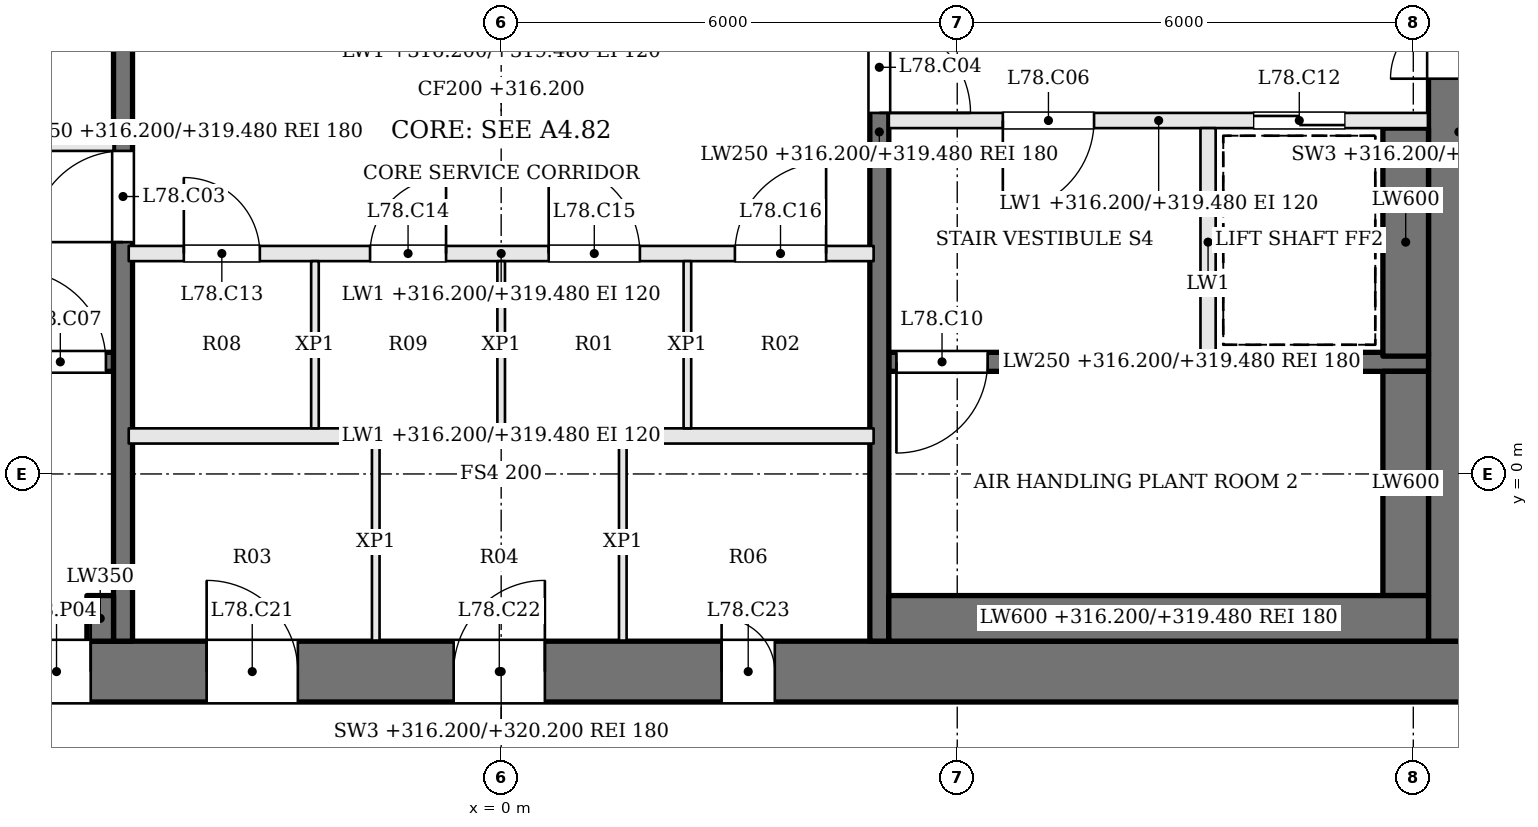
"""IFC4 building model, lengths in metres.
Left out: names, types, materials, properties, quantities, classifications, styles, units other than length and angle.
Written with IfcOpenShell. Run it as: python <this file> out.ifc"""

import sys

from ifc_helpers import new_model, si_unit, direction, frame, frame_2d, origin, place, context, subcontext, project, spatial, rectangle, extrude, element, fill, save


model = new_model("IFC4")
c1 = context("Model", 3, precision=1e-05, world=origin(), true_north=direction((0.0, 1.0)))
c2 = subcontext(c1, "Body", "Model", "MODEL_VIEW")
j1 = project(units=[si_unit("LENGTHUNIT", "METRE"), si_unit("PLANEANGLEUNIT", "RADIAN")], contexts=[c1])
p1 = place(None, origin())
s1 = spatial("IfcSite", under=j1, at=p1, CompositionType="ELEMENT")
p2 = place(p1, origin())
s2 = spatial("IfcBuilding", under=s1, at=p2, CompositionType="ELEMENT")
p3 = place(p2, frame((0.0, 0.0, 316.2)))
s3 = spatial("IfcBuildingStorey", under=s2, at=p3, CompositionType="ELEMENT", Elevation=316.2)
p4 = place(p3, frame((-13.0, -2.6, 0.0), z_axis=(0.0, 0.0, 1.0), x_axis=(1.0, 0.0, 0.0)))
e1 = element("IfcWall", 1, at=p4, inside=s3, PredefinedType="SHEAR", context=c2, shape_type="SweptSolid", body=[
    extrude(rectangle(XDim=26.0, YDim=0.8, at=frame_2d((13.0, 0.0))), origin(), (0.0, 0.0, 1.0), 4.0),
])
p5 = place(p4, frame((9.125, 0.0, 0.0)))
e2 = element("IfcOpeningElement", 2, at=p5, cuts=e1, PredefinedType="OPENING", context=c2, shape_type="SweptSolid", body=[
    extrude(rectangle(XDim=1.2, YDim=2.1, at=frame_2d((0.6, 1.05))), frame((0.0, 0.41, 0.0), z_axis=(0.0, -1.0, 0.0), x_axis=(1.0, 0.0, 0.0)), (0.0, 0.0, 1.0), 0.82),
])
p6 = place(p4, frame((12.375, 0.0, 0.0)))
e3 = element("IfcOpeningElement", 3, at=p6, cuts=e1, PredefinedType="OPENING", context=c2, shape_type="SweptSolid", body=[
    extrude(rectangle(XDim=1.2, YDim=2.1, at=frame_2d((0.6, 1.05))), frame((0.0, 0.41, 0.0), z_axis=(0.0, -1.0, 0.0), x_axis=(1.0, 0.0, 0.0)), (0.0, 0.0, 1.0), 0.82),
])
p7 = place(p4, frame((15.9, 0.0, 0.0)))
e4 = element("IfcOpeningElement", 4, at=p7, cuts=e1, PredefinedType="OPENING", context=c2, shape_type="SweptSolid", body=[
    extrude(rectangle(XDim=0.7, YDim=2.1, at=frame_2d((0.35, 1.05))), frame((0.0, 0.41, 0.0), z_axis=(0.0, -1.0, 0.0), x_axis=(1.0, 0.0, 0.0)), (0.0, 0.0, 1.0), 0.82),
])
p8 = place(p4, frame((6.7, 0.0, 0.0)))
e5 = element("IfcOpeningElement", 5, at=p8, cuts=e1, PredefinedType="OPENING", context=c2, shape_type="SweptSolid", body=[
    extrude(rectangle(XDim=0.9, YDim=2.1, at=frame_2d((0.45, 1.05))), frame((0.0, 0.41, 0.0), z_axis=(0.0, -1.0, 0.0), x_axis=(1.0, 0.0, 0.0)), (0.0, 0.0, 1.0), 0.82),
])
p9 = place(p3, frame((12.6, -2.2, 0.0), z_axis=(0.0, 0.0, 1.0), x_axis=(0.0, 1.0, 0.0)))
e6 = element("IfcWall", 6, at=p9, inside=s3, PredefinedType="SHEAR", context=c2, shape_type="SweptSolid", body=[
    extrude(rectangle(XDim=13.4, YDim=0.8, at=frame_2d((6.7, 0.0))), origin(), (0.0, 0.0, 1.0), 4.0),
])
p10 = place(p9, frame((7.4, 0.0, 0.0)))
e7 = element("IfcOpeningElement", 7, at=p10, cuts=e6, PredefinedType="OPENING", context=c2, shape_type="SweptSolid", body=[
    extrude(rectangle(XDim=1.8, YDim=2.1, at=frame_2d((0.9, 1.05))), frame((0.0, 0.41, 0.0), z_axis=(0.0, -1.0, 0.0), x_axis=(1.0, 0.0, 0.0)), (0.0, 0.0, 1.0), 0.82),
])
p11 = place(p3, frame((-12.2, 1.475, 0.0), z_axis=(0.0, 0.0, 1.0), x_axis=(1.0, 0.0, 0.0)))
e8 = element("IfcWall", 8, at=p11, inside=s3, PredefinedType="SOLIDWALL", context=c2, shape_type="SweptSolid", body=[
    extrude(rectangle(XDim=7.1, YDim=0.25, at=frame_2d((3.55, 0.0))), origin(), (0.0, 0.0, 1.0), 3.28),
])
p12 = place(p11, frame((5.8, 0.0, 0.0)))
e9 = element("IfcOpeningElement", 9, at=p12, cuts=e8, PredefinedType="OPENING", context=c2, shape_type="SweptSolid", body=[
    extrude(rectangle(XDim=1.2, YDim=2.1, at=frame_2d((0.6, 1.05))), frame((0.0, 0.135, 0.0), z_axis=(0.0, -1.0, 0.0), x_axis=(1.0, 0.0, 0.0)), (0.0, 0.0, 1.0), 0.27),
])
p13 = place(p3, frame((-12.2, 4.35, 0.0), z_axis=(0.0, 0.0, 1.0), x_axis=(1.0, 0.0, 0.0)))
e10 = element("IfcWall", 10, at=p13, inside=s3, PredefinedType="SOLIDWALL", context=c2, shape_type="SweptSolid", body=[
    extrude(rectangle(XDim=7.1, YDim=0.2, at=frame_2d((3.55, 0.0))), origin(), (0.0, 0.0, 1.0), 3.28),
])
p14 = place(p13, frame((4.4, 0.0, 0.0)))
e11 = element("IfcOpeningElement", 11, at=p14, cuts=e10, PredefinedType="OPENING", context=c2, shape_type="SweptSolid", body=[
    extrude(rectangle(XDim=1.2, YDim=2.1, at=frame_2d((0.6, 1.05))), frame((0.0, 0.11, 0.0), z_axis=(0.0, -1.0, 0.0), x_axis=(1.0, 0.0, 0.0)), (0.0, 0.0, 1.0), 0.22),
])
p15 = place(p13, frame((1.1, 0.0, 0.0)))
e12 = element("IfcOpeningElement", 12, at=p15, cuts=e10, PredefinedType="OPENING", context=c2, shape_type="SweptSolid", body=[
    extrude(rectangle(XDim=1.2, YDim=2.1, at=frame_2d((0.6, 1.05))), frame((0.0, 0.11, 0.0), z_axis=(0.0, -1.0, 0.0), x_axis=(1.0, 0.0, 0.0)), (0.0, 0.0, 1.0), 0.22),
])
p16 = place(p3, frame((12.2, 4.65, 0.0), z_axis=(0.0, 0.0, 1.0), x_axis=(-1.0, 0.0, 0.0)))
e13 = element("IfcWall", 13, at=p16, inside=s3, PredefinedType="SOLIDWALL", context=c2, shape_type="SweptSolid", body=[
    extrude(rectangle(XDim=7.1, YDim=0.2, at=frame_2d((3.55, 0.0))), origin(), (0.0, 0.0, 1.0), 3.28),
])
p17 = place(p16, frame((4.4, 0.0, 0.0)))
e14 = element("IfcOpeningElement", 14, at=p17, cuts=e13, PredefinedType="OPENING", context=c2, shape_type="SweptSolid", body=[
    extrude(rectangle(XDim=1.2, YDim=2.1, at=frame_2d((0.6, 1.05))), frame((0.0, 0.11, 0.0), z_axis=(0.0, -1.0, 0.0), x_axis=(1.0, 0.0, 0.0)), (0.0, 0.0, 1.0), 0.22),
])
p18 = place(p16, frame((1.1, 0.0, 0.0)))
e15 = element("IfcOpeningElement", 15, at=p18, cuts=e13, PredefinedType="OPENING", context=c2, shape_type="SweptSolid", body=[
    extrude(rectangle(XDim=1.2, YDim=2.1, at=frame_2d((0.6, 1.05))), frame((0.0, 0.11, 0.0), z_axis=(0.0, -1.0, 0.0), x_axis=(1.0, 0.0, 0.0)), (0.0, 0.0, 1.0), 0.22),
])
p19 = place(p3, frame((12.2, 1.475, 0.0), z_axis=(0.0, 0.0, 1.0), x_axis=(-1.0, 0.0, 0.0)))
e16 = element("IfcWall", 16, at=p19, inside=s3, PredefinedType="SOLIDWALL", context=c2, shape_type="SweptSolid", body=[
    extrude(rectangle(XDim=7.1, YDim=0.25, at=frame_2d((3.55, 0.0))), origin(), (0.0, 0.0, 1.0), 3.28),
])
p20 = place(p19, frame((5.8, 0.0, 0.0)))
e17 = element("IfcOpeningElement", 17, at=p20, cuts=e16, PredefinedType="OPENING", context=c2, shape_type="SweptSolid", body=[
    extrude(rectangle(XDim=1.2, YDim=2.1, at=frame_2d((0.6, 1.05))), frame((0.0, 0.135, 0.0), z_axis=(0.0, -1.0, 0.0), x_axis=(1.0, 0.0, 0.0)), (0.0, 0.0, 1.0), 0.27),
])
p21 = place(p3, frame((9.3, 4.55, 0.0), z_axis=(0.0, 0.0, 1.0), x_axis=(0.0, -1.0, 0.0)))
e18 = element("IfcWall", 18, at=p21, inside=s3, PredefinedType="SOLIDWALL", context=c2, shape_type="SweptSolid", body=[
    extrude(rectangle(XDim=3.0, YDim=0.2, at=frame_2d((1.5, 0.0))), origin(), (0.0, 0.0, 1.0), 3.28),
])
p22 = place(p3, frame((-4.975, -2.2, 0.0), z_axis=(0.0, 0.0, 1.0), x_axis=(0.0, 1.0, 0.0)))
e19 = element("IfcWall", 19, at=p22, inside=s3, PredefinedType="SOLIDWALL", context=c2, shape_type="SweptSolid", body=[
    extrude(rectangle(XDim=13.4, YDim=0.25, at=frame_2d((6.7, 0.0))), origin(), (0.0, 0.0, 1.0), 3.28),
])
p23 = place(p22, frame((5.25, 0.0, 0.0)))
e20 = element("IfcOpeningElement", 20, at=p23, cuts=e19, PredefinedType="OPENING", context=c2, shape_type="SweptSolid", body=[
    extrude(rectangle(XDim=1.2, YDim=2.1, at=frame_2d((0.6, 1.05))), frame((0.0, 0.135, 0.0), z_axis=(0.0, -1.0, 0.0), x_axis=(1.0, 0.0, 0.0)), (0.0, 0.0, 1.0), 0.27),
])
p24 = place(p3, frame((4.975, 11.2, 0.0), z_axis=(0.0, 0.0, 1.0), x_axis=(0.0, -1.0, 0.0)))
e21 = element("IfcWall", 21, at=p24, inside=s3, PredefinedType="SOLIDWALL", context=c2, shape_type="SweptSolid", body=[
    extrude(rectangle(XDim=13.4, YDim=0.25, at=frame_2d((6.7, 0.0))), origin(), (0.0, 0.0, 1.0), 3.28),
])
p25 = place(p24, frame((5.25, 0.0, 0.0)))
e22 = element("IfcOpeningElement", 22, at=p25, cuts=e21, PredefinedType="OPENING", context=c2, shape_type="SweptSolid", body=[
    extrude(rectangle(XDim=1.2, YDim=2.1, at=frame_2d((0.6, 1.05))), frame((0.0, 0.135, 0.0), z_axis=(0.0, -1.0, 0.0), x_axis=(1.0, 0.0, 0.0)), (0.0, 0.0, 1.0), 0.27),
])
p26 = place(p3, frame((-5.275, -2.2, 0.0), z_axis=(0.0, 0.0, 1.0), x_axis=(0.0, 1.0, 0.0)))
e23 = element("IfcWall", 23, at=p26, inside=s3, PredefinedType="SOLIDWALL", context=c2, shape_type="SweptSolid", body=[
    extrude(rectangle(XDim=0.6, YDim=0.35, at=frame_2d((0.3, 0.0))), origin(), (0.0, 0.0, 1.0), 3.28),
])
p27 = place(p3, frame((11.9, 4.55, 0.0), z_axis=(0.0, 0.0, 1.0), x_axis=(0.0, -1.0, 0.0)))
e24 = element("IfcWall", 24, at=p27, inside=s3, PredefinedType="SOLIDWALL", context=c2, shape_type="SweptSolid", body=[
    extrude(rectangle(XDim=3.0, YDim=0.6, at=frame_2d((1.5, 0.0))), origin(), (0.0, 0.0, 1.0), 3.28),
])
p28 = place(p3, frame((11.9, 1.35, 0.0), z_axis=(0.0, 0.0, 1.0), x_axis=(0.0, -1.0, 0.0)))
e25 = element("IfcWall", 25, at=p28, inside=s3, PredefinedType="SOLIDWALL", context=c2, shape_type="SweptSolid", body=[
    extrude(rectangle(XDim=2.95, YDim=0.6, at=frame_2d((1.475, 0.0))), origin(), (0.0, 0.0, 1.0), 3.28),
])
p29 = place(p3, frame((12.2, -1.9, 0.0), z_axis=(0.0, 0.0, 1.0), x_axis=(-1.0, 0.0, 0.0)))
e26 = element("IfcWall", 26, at=p29, inside=s3, PredefinedType="SOLIDWALL", context=c2, shape_type="SweptSolid", body=[
    extrude(rectangle(XDim=7.1, YDim=0.6, at=frame_2d((3.55, 0.0))), origin(), (0.0, 0.0, 1.0), 3.28),
])
p30 = place(p3, frame((-4.9, 0.5, 0.0), z_axis=(0.0, 0.0, 1.0), x_axis=(1.0, 0.0, 0.0)))
e27 = element("IfcWall", 27, at=p30, inside=s3, PredefinedType="SOLIDWALL", context=c2, shape_type="SweptSolid", body=[
    extrude(rectangle(XDim=9.8, YDim=0.2, at=frame_2d((4.9, 0.0))), origin(), (0.0, 0.0, 1.0), 3.28),
])
p31 = place(p3, frame((-4.9, 2.9, 0.0), z_axis=(0.0, 0.0, 1.0), x_axis=(1.0, 0.0, 0.0)))
e28 = element("IfcWall", 28, at=p31, inside=s3, PredefinedType="SOLIDWALL", context=c2, shape_type="SweptSolid", body=[
    extrude(rectangle(XDim=9.8, YDim=0.2, at=frame_2d((4.9, 0.0))), origin(), (0.0, 0.0, 1.0), 3.28),
])
p32 = place(p31, frame((0.725, 0.0, 0.0)))
e29 = element("IfcOpeningElement", 29, at=p32, cuts=e28, PredefinedType="OPENING", context=c2, shape_type="SweptSolid", body=[
    extrude(rectangle(XDim=1.0, YDim=2.1, at=frame_2d((0.5, 1.05))), frame((0.0, 0.11, 0.0), z_axis=(0.0, -1.0, 0.0), x_axis=(1.0, 0.0, 0.0)), (0.0, 0.0, 1.0), 0.22),
])
p33 = place(p31, frame((3.175, 0.0, 0.0)))
e30 = element("IfcOpeningElement", 30, at=p33, cuts=e28, PredefinedType="OPENING", context=c2, shape_type="SweptSolid", body=[
    extrude(rectangle(XDim=1.0, YDim=2.1, at=frame_2d((0.5, 1.05))), frame((0.0, 0.11, 0.0), z_axis=(0.0, -1.0, 0.0), x_axis=(1.0, 0.0, 0.0)), (0.0, 0.0, 1.0), 0.22),
])
p34 = place(p31, frame((5.525, 0.0, 0.0)))
e31 = element("IfcOpeningElement", 31, at=p34, cuts=e28, PredefinedType="OPENING", context=c2, shape_type="SweptSolid", body=[
    extrude(rectangle(XDim=1.2, YDim=2.1, at=frame_2d((0.6, 1.05))), frame((0.0, 0.11, 0.0), z_axis=(0.0, -1.0, 0.0), x_axis=(1.0, 0.0, 0.0)), (0.0, 0.0, 1.0), 0.22),
])
p35 = place(p31, frame((7.975, 0.0, 0.0)))
e32 = element("IfcOpeningElement", 32, at=p35, cuts=e28, PredefinedType="OPENING", context=c2, shape_type="SweptSolid", body=[
    extrude(rectangle(XDim=1.2, YDim=2.1, at=frame_2d((0.6, 1.05))), frame((0.0, 0.11, 0.0), z_axis=(0.0, -1.0, 0.0), x_axis=(1.0, 0.0, 0.0)), (0.0, 0.0, 1.0), 0.22),
])
for number, where, z_axis, x_axis in (
    (33, (-2.45, 0.6, 0.0), (0.0, 0.0, 1.0), (0.0, 1.0, 0.0)),
    (34, (0.0, 0.6, 0.0), (0.0, 0.0, 1.0), (0.0, 1.0, 0.0)),
    (35, (2.45, 0.6, 0.0), (0.0, 0.0, 1.0), (0.0, 1.0, 0.0)),
):
    element("IfcWall", number, at=place(p3, frame(where, z_axis=z_axis, x_axis=x_axis)), inside=s3, PredefinedType="PARTITIONING", context=c2, shape_type="SweptSolid", body=[
        extrude(rectangle(XDim=2.2, YDim=0.1, at=frame_2d((1.1, 0.0))), origin(), (0.0, 0.0, 1.0), 3.28),
    ])
for number, where, z_axis, x_axis in (
    (36, (-1.65, -2.2, 0.0), (0.0, 0.0, 1.0), (0.0, 1.0, 0.0)),
    (37, (1.6, -2.2, 0.0), (0.0, 0.0, 1.0), (0.0, 1.0, 0.0)),
):
    element("IfcWall", number, at=place(p3, frame(where, z_axis=z_axis, x_axis=x_axis)), inside=s3, PredefinedType="PARTITIONING", context=c2, shape_type="SweptSolid", body=[
        extrude(rectangle(XDim=2.6, YDim=0.1, at=frame_2d((1.3, 0.0))), origin(), (0.0, 0.0, 1.0), 3.28),
    ])
p36 = place(p10, origin())
e38 = element("IfcDoor", 38, at=p36, inside=s3, OperationType="DOUBLE_DOOR_SINGLE_SWING", PredefinedType="DOOR", context=c2, shape_type="SweptSolid", body=[
    extrude(rectangle(XDim=1.8, YDim=2.1, at=frame_2d((0.9, 1.05))), frame((0.0, 0.025, 0.0), z_axis=(0.0, -1.0, 0.0), x_axis=(1.0, 0.0, 0.0)), (0.0, 0.0, 1.0), 0.05),
])
fill(e7, e38)
p37 = place(p23, origin())
e39 = element("IfcDoor", 39, at=p37, inside=s3, OperationType="SINGLE_SWING_LEFT", PredefinedType="DOOR", context=c2, shape_type="SweptSolid", body=[
    extrude(rectangle(XDim=1.2, YDim=2.1, at=frame_2d((0.6, 1.05))), frame((0.0, 0.025, 0.0), z_axis=(0.0, -1.0, 0.0), x_axis=(1.0, 0.0, 0.0)), (0.0, 0.0, 1.0), 0.05),
])
fill(e20, e39)
p38 = place(p25, origin())
e40 = element("IfcDoor", 40, at=p38, inside=s3, OperationType="SINGLE_SWING_RIGHT", PredefinedType="DOOR", context=c2, shape_type="SweptSolid", body=[
    extrude(rectangle(XDim=1.2, YDim=2.1, at=frame_2d((0.6, 1.05))), frame((0.0, 0.025, 0.0), z_axis=(0.0, -1.0, 0.0), x_axis=(1.0, 0.0, 0.0)), (0.0, 0.0, 1.0), 0.05),
])
fill(e22, e40)
p39 = place(p17, origin())
e41 = element("IfcDoor", 41, at=p39, inside=s3, OperationType="SINGLE_SWING_RIGHT", PredefinedType="DOOR", context=c2, shape_type="SweptSolid", body=[
    extrude(rectangle(XDim=1.2, YDim=2.1, at=frame_2d((0.6, 1.05))), frame((0.0, 0.025, 0.0), z_axis=(0.0, -1.0, 0.0), x_axis=(1.0, 0.0, 0.0)), (0.0, 0.0, 1.0), 0.05),
])
fill(e14, e41)
p40 = place(p12, origin())
e42 = element("IfcDoor", 42, at=p40, inside=s3, OperationType="SINGLE_SWING_LEFT", PredefinedType="DOOR", context=c2, shape_type="SweptSolid", body=[
    extrude(rectangle(XDim=1.2, YDim=2.1, at=frame_2d((0.6, 1.05))), frame((0.0, 0.025, 0.0), z_axis=(0.0, -1.0, 0.0), x_axis=(1.0, 0.0, 0.0)), (0.0, 0.0, 1.0), 0.05),
])
fill(e9, e42)
p41 = place(p20, origin())
e43 = element("IfcDoor", 43, at=p41, inside=s3, OperationType="SINGLE_SWING_RIGHT", PredefinedType="DOOR", context=c2, shape_type="SweptSolid", body=[
    extrude(rectangle(XDim=1.2, YDim=2.1, at=frame_2d((0.6, 1.05))), frame((0.0, 0.025, 0.0), z_axis=(0.0, -1.0, 0.0), x_axis=(1.0, 0.0, 0.0)), (0.0, 0.0, 1.0), 0.05),
])
fill(e17, e43)
p42 = place(p18, origin())
e44 = element("IfcDoor", 44, at=p42, inside=s3, OperationType="SLIDING_TO_RIGHT", PredefinedType="DOOR", context=c2, shape_type="SweptSolid", body=[
    extrude(rectangle(XDim=1.2, YDim=2.1, at=frame_2d((0.6, 1.05))), frame((0.0, 0.025, 0.0), z_axis=(0.0, -1.0, 0.0), x_axis=(1.0, 0.0, 0.0)), (0.0, 0.0, 1.0), 0.05),
])
fill(e15, e44)
p43 = place(p32, origin())
e45 = element("IfcDoor", 45, at=p43, inside=s3, OperationType="SINGLE_SWING_LEFT", PredefinedType="DOOR", context=c2, shape_type="SweptSolid", body=[
    extrude(rectangle(XDim=1.0, YDim=2.1, at=frame_2d((0.5, 1.05))), frame((0.0, 0.025, 0.0), z_axis=(0.0, -1.0, 0.0), x_axis=(1.0, 0.0, 0.0)), (0.0, 0.0, 1.0), 0.05),
])
fill(e29, e45)
p44 = place(p33, origin())
e46 = element("IfcDoor", 46, at=p44, inside=s3, OperationType="SINGLE_SWING_RIGHT", PredefinedType="DOOR", context=c2, shape_type="SweptSolid", body=[
    extrude(rectangle(XDim=1.0, YDim=2.1, at=frame_2d((0.5, 1.05))), frame((0.0, 0.025, 0.0), z_axis=(0.0, -1.0, 0.0), x_axis=(1.0, 0.0, 0.0)), (0.0, 0.0, 1.0), 0.05),
])
fill(e30, e46)
p45 = place(p34, origin())
e47 = element("IfcDoor", 47, at=p45, inside=s3, OperationType="SINGLE_SWING_LEFT", PredefinedType="DOOR", context=c2, shape_type="SweptSolid", body=[
    extrude(rectangle(XDim=1.2, YDim=2.1, at=frame_2d((0.6, 1.05))), frame((0.0, 0.025, 0.0), z_axis=(0.0, -1.0, 0.0), x_axis=(1.0, 0.0, 0.0)), (0.0, 0.0, 1.0), 0.05),
])
fill(e31, e47)
p46 = place(p35, origin())
e48 = element("IfcDoor", 48, at=p46, inside=s3, OperationType="SINGLE_SWING_RIGHT", PredefinedType="DOOR", context=c2, shape_type="SweptSolid", body=[
    extrude(rectangle(XDim=1.2, YDim=2.1, at=frame_2d((0.6, 1.05))), frame((0.0, 0.025, 0.0), z_axis=(0.0, -1.0, 0.0), x_axis=(1.0, 0.0, 0.0)), (0.0, 0.0, 1.0), 0.05),
])
fill(e32, e48)
p47 = place(p5, origin())
e49 = element("IfcDoor", 49, at=p47, inside=s3, OperationType="SINGLE_SWING_LEFT", PredefinedType="DOOR", context=c2, shape_type="SweptSolid", body=[
    extrude(rectangle(XDim=1.2, YDim=2.1, at=frame_2d((0.6, 1.05))), frame((0.0, 0.025, 0.0), z_axis=(0.0, -1.0, 0.0), x_axis=(1.0, 0.0, 0.0)), (0.0, 0.0, 1.0), 0.05),
])
fill(e2, e49)
p48 = place(p6, origin())
e50 = element("IfcDoor", 50, at=p48, inside=s3, OperationType="SINGLE_SWING_RIGHT", PredefinedType="DOOR", context=c2, shape_type="SweptSolid", body=[
    extrude(rectangle(XDim=1.2, YDim=2.1, at=frame_2d((0.6, 1.05))), frame((0.0, 0.025, 0.0), z_axis=(0.0, -1.0, 0.0), x_axis=(1.0, 0.0, 0.0)), (0.0, 0.0, 1.0), 0.05),
])
fill(e3, e50)
p49 = place(p7, origin())
e51 = element("IfcDoor", 51, at=p49, inside=s3, OperationType="SINGLE_SWING_LEFT", PredefinedType="DOOR", context=c2, shape_type="SweptSolid", body=[
    extrude(rectangle(XDim=0.7, YDim=2.1, at=frame_2d((0.35, 1.05))), frame((0.0, 0.025, 0.0), z_axis=(0.0, -1.0, 0.0), x_axis=(1.0, 0.0, 0.0)), (0.0, 0.0, 1.0), 0.05),
])
fill(e4, e51)
p50 = place(p8, origin())
e52 = element("IfcDoor", 52, at=p50, inside=s3, OperationType="SINGLE_SWING_RIGHT", PredefinedType="DOOR", context=c2, shape_type="SweptSolid", body=[
    extrude(rectangle(XDim=0.9, YDim=2.1, at=frame_2d((0.45, 1.05))), frame((0.0, 0.025, 0.0), z_axis=(0.0, -1.0, 0.0), x_axis=(1.0, 0.0, 0.0)), (0.0, 0.0, 1.0), 0.05),
])
fill(e5, e52)
save(model, sys.argv[1])
